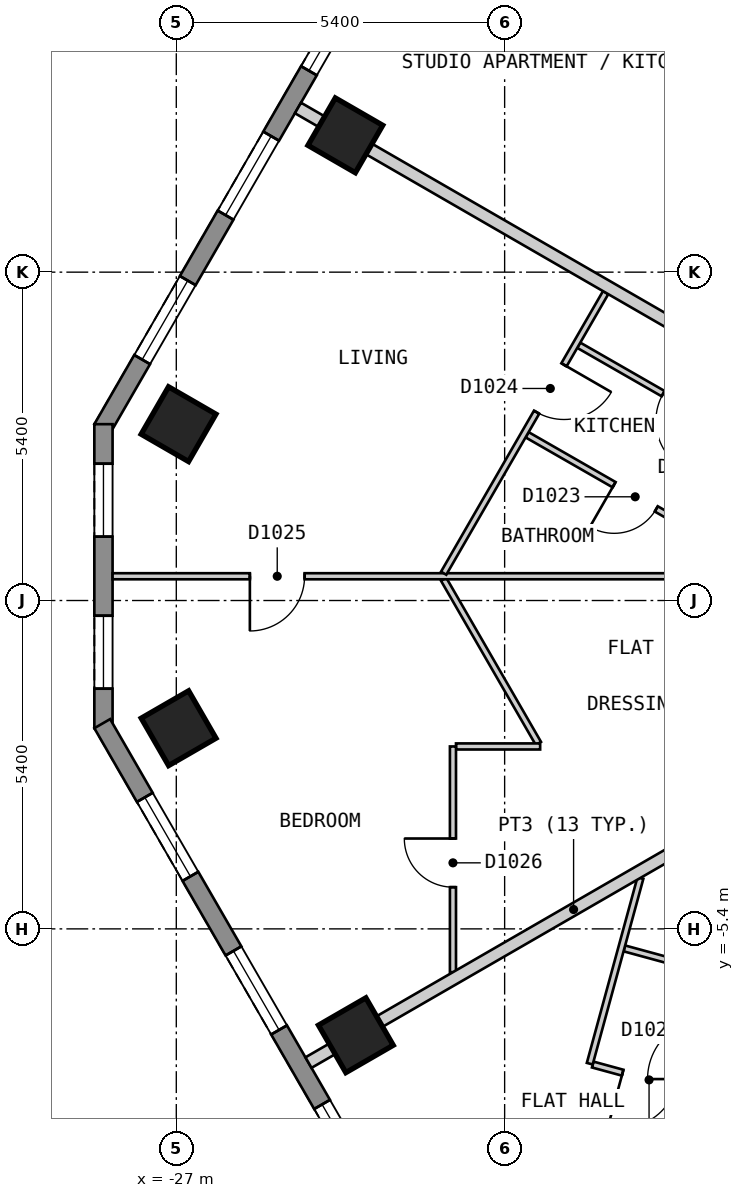
"""IFC4 building model, lengths in metres.
Left out: names, types, materials, properties, quantities, classifications, styles, units other than length and angle.
Written with IfcOpenShell. Run it as: python <this file> out.ifc"""

import sys

from ifc_helpers import new_model, si_unit, direction, frame, frame_2d, origin, origin_2d, place, context, subcontext, project, spatial, polyline, rectangle, outline, extrude, element, fill, save


model = new_model("IFC4")
c1 = context("Model", 3, precision=1e-05, world=origin(), true_north=direction((0.0, 1.0)))
c2 = subcontext(c1, "Body", "Model", "MODEL_VIEW")
j1 = project(units=[si_unit("LENGTHUNIT", "METRE"), si_unit("PLANEANGLEUNIT", "RADIAN")], contexts=[c1])
p1 = place(None, origin())
s1 = spatial("IfcSite", under=j1, at=p1, CompositionType="ELEMENT")
p2 = place(p1, origin())
s2 = spatial("IfcBuilding", under=s1, at=p2, CompositionType="ELEMENT")
p3 = place(p2, frame((0.0, 0.0, 126.6)))
s3 = spatial("IfcBuildingStorey", under=s2, at=p3, CompositionType="ELEMENT", Elevation=126.6)
for number, where, z_axis, x_axis in (
    (1, (-24.22, 7.65, 0.0), (0.0, 0.0, 1.0), (-0.5, -0.866, 0.0)),
    (2, (-26.963, 2.9, 0.0), (0.0, 0.0, 1.0), (-0.5, -0.866, 0.0)),
    (3, (-26.962, -2.1, 0.0), (0.0, 0.0, 1.0), (0.5, -0.866, 0.0)),
    (4, (-24.047, -7.149, 0.0), (0.0, 0.0, 1.0), (0.5, -0.866, 0.0)),
):
    element("IfcColumn", number, at=place(p3, frame(where, z_axis=z_axis, x_axis=x_axis)), inside=s3, PredefinedType="COLUMN", context=c2, shape_type="SweptSolid", body=[
        extrude(rectangle(XDim=0.9, YDim=0.9, at=origin_2d()), origin(), (0.0, 0.0, 1.0), 3.0),
    ])
p4 = place(p3, frame((-16.555, 23.025, 0.0), z_axis=(0.0, 0.0, 1.0), x_axis=(-0.500020536353, -0.866013546791, 0.0)))
e5 = element("IfcWall", 5, at=p4, inside=s3, PredefinedType="SOLIDWALL", context=c2, shape_type="SweptSolid", body=[
    extrude(outline(polyline([(0.0, -0.15), (23.325, -0.15), (23.245, 0.15), (0.08, 0.15), (0.0, -0.15)])), origin(), (0.0, 0.0, 1.0), 2.7),
])
p5 = place(p4, frame((1.314, 0.0, 0.15)))
e6 = element("IfcOpeningElement", 6, at=p5, cuts=e5, PredefinedType="OPENING", context=c2, shape_type="SweptSolid", body=[
    extrude(rectangle(XDim=1.5, YDim=2.1, at=frame_2d((0.75, 1.05))), frame((0.0, 0.16, 0.0), z_axis=(0.0, -1.0, 0.0), x_axis=(1.0, 0.0, 0.0)), (0.0, 0.0, 1.0), 0.32),
])
p6 = place(p4, frame((4.056, 0.0, 0.15)))
e7 = element("IfcOpeningElement", 7, at=p6, cuts=e5, PredefinedType="OPENING", context=c2, shape_type="SweptSolid", body=[
    extrude(rectangle(XDim=1.5, YDim=2.1, at=frame_2d((0.75, 1.05))), frame((0.0, 0.16, 0.0), z_axis=(0.0, -1.0, 0.0), x_axis=(1.0, 0.0, 0.0)), (0.0, 0.0, 1.0), 0.32),
])
p7 = place(p4, frame((6.799, 0.0, 0.15)))
e8 = element("IfcOpeningElement", 8, at=p7, cuts=e5, PredefinedType="OPENING", context=c2, shape_type="SweptSolid", body=[
    extrude(rectangle(XDim=1.5, YDim=2.1, at=frame_2d((0.75, 1.05))), frame((0.0, 0.16, 0.0), z_axis=(0.0, -1.0, 0.0), x_axis=(1.0, 0.0, 0.0)), (0.0, 0.0, 1.0), 0.32),
])
p8 = place(p4, frame((9.541, 0.0, 0.15)))
e9 = element("IfcOpeningElement", 9, at=p8, cuts=e5, PredefinedType="OPENING", context=c2, shape_type="SweptSolid", body=[
    extrude(rectangle(XDim=1.5, YDim=2.1, at=frame_2d((0.75, 1.05))), frame((0.0, 0.16, 0.0), z_axis=(0.0, -1.0, 0.0), x_axis=(1.0, 0.0, 0.0)), (0.0, 0.0, 1.0), 0.32),
])
p9 = place(p4, frame((12.285, 0.0, 0.15)))
e10 = element("IfcOpeningElement", 10, at=p9, cuts=e5, PredefinedType="OPENING", context=c2, shape_type="SweptSolid", body=[
    extrude(rectangle(XDim=1.5, YDim=2.1, at=frame_2d((0.75, 1.05))), frame((0.0, 0.16, 0.0), z_axis=(0.0, -1.0, 0.0), x_axis=(1.0, 0.0, 0.0)), (0.0, 0.0, 1.0), 0.32),
])
p10 = place(p4, frame((15.027, 0.0, 0.15)))
e11 = element("IfcOpeningElement", 11, at=p10, cuts=e5, PredefinedType="OPENING", context=c2, shape_type="SweptSolid", body=[
    extrude(rectangle(XDim=1.5, YDim=2.1, at=frame_2d((0.75, 1.05))), frame((0.0, 0.16, 0.0), z_axis=(0.0, -1.0, 0.0), x_axis=(1.0, 0.0, 0.0)), (0.0, 0.0, 1.0), 0.32),
])
p11 = place(p4, frame((17.769, 0.0, 0.15)))
e12 = element("IfcOpeningElement", 12, at=p11, cuts=e5, PredefinedType="OPENING", context=c2, shape_type="SweptSolid", body=[
    extrude(rectangle(XDim=1.5, YDim=2.1, at=frame_2d((0.75, 1.05))), frame((0.0, 0.16, 0.0), z_axis=(0.0, -1.0, 0.0), x_axis=(1.0, 0.0, 0.0)), (0.0, 0.0, 1.0), 0.32),
])
p12 = place(p4, frame((20.512, 0.0, 0.15)))
e13 = element("IfcOpeningElement", 13, at=p12, cuts=e5, PredefinedType="OPENING", context=c2, shape_type="SweptSolid", body=[
    extrude(rectangle(XDim=1.5, YDim=2.1, at=frame_2d((0.75, 1.05))), frame((0.0, 0.16, 0.0), z_axis=(0.0, -1.0, 0.0), x_axis=(1.0, 0.0, 0.0)), (0.0, 0.0, 1.0), 0.32),
])
p13 = place(p3, frame((-28.198, 2.9, 0.0), z_axis=(0.0, 0.0, 1.0), x_axis=(0.0, -1.0, 0.0)))
e14 = element("IfcWall", 14, at=p13, inside=s3, PredefinedType="SOLIDWALL", context=c2, shape_type="SweptSolid", body=[
    extrude(outline(polyline([(0.0, -0.15), (5.0, -0.15), (4.92, 0.15), (0.08, 0.15), (0.0, -0.15)])), origin(), (0.0, 0.0, 1.0), 2.7),
])
p14 = place(p13, frame((0.65, 0.0, 0.15)))
e15 = element("IfcOpeningElement", 15, at=p14, cuts=e14, PredefinedType="OPENING", context=c2, shape_type="SweptSolid", body=[
    extrude(rectangle(XDim=1.2, YDim=2.1, at=frame_2d((0.6, 1.05))), frame((0.0, 0.16, 0.0), z_axis=(0.0, -1.0, 0.0), x_axis=(1.0, 0.0, 0.0)), (0.0, 0.0, 1.0), 0.32),
])
p15 = place(p13, frame((3.15, 0.0, 0.15)))
e16 = element("IfcOpeningElement", 16, at=p15, cuts=e14, PredefinedType="OPENING", context=c2, shape_type="SweptSolid", body=[
    extrude(rectangle(XDim=1.2, YDim=2.1, at=frame_2d((0.6, 1.05))), frame((0.0, 0.16, 0.0), z_axis=(0.0, -1.0, 0.0), x_axis=(1.0, 0.0, 0.0)), (0.0, 0.0, 1.0), 0.32),
])
p16 = place(p3, frame((-28.218, -2.025, 0.0), z_axis=(0.0, 0.0, 1.0), x_axis=(0.500017503135, -0.866015298109, 0.0)))
e17 = element("IfcWall", 17, at=p16, inside=s3, PredefinedType="SOLIDWALL", context=c2, shape_type="SweptSolid", body=[
    extrude(outline(polyline([(0.0, -0.15), (24.711, -0.15), (24.631, 0.15), (0.08, 0.15), (0.0, -0.15)])), origin(), (0.0, 0.0, 1.0), 2.7),
])
p17 = place(p16, frame((1.4, 0.0, 0.15)))
e18 = element("IfcOpeningElement", 18, at=p17, cuts=e17, PredefinedType="OPENING", context=c2, shape_type="SweptSolid", body=[
    extrude(rectangle(XDim=1.5, YDim=2.1, at=frame_2d((0.75, 1.05))), frame((0.0, 0.16, 0.0), z_axis=(0.0, -1.0, 0.0), x_axis=(1.0, 0.0, 0.0)), (0.0, 0.0, 1.0), 0.32),
])
p18 = place(p16, frame((4.316, 0.0, 0.15)))
e19 = element("IfcOpeningElement", 19, at=p18, cuts=e17, PredefinedType="OPENING", context=c2, shape_type="SweptSolid", body=[
    extrude(rectangle(XDim=1.5, YDim=2.1, at=frame_2d((0.75, 1.05))), frame((0.0, 0.16, 0.0), z_axis=(0.0, -1.0, 0.0), x_axis=(1.0, 0.0, 0.0)), (0.0, 0.0, 1.0), 0.32),
])
p19 = place(p16, frame((7.231, 0.0, 0.15)))
e20 = element("IfcOpeningElement", 20, at=p19, cuts=e17, PredefinedType="OPENING", context=c2, shape_type="SweptSolid", body=[
    extrude(rectangle(XDim=1.5, YDim=2.1, at=frame_2d((0.75, 1.05))), frame((0.0, 0.16, 0.0), z_axis=(0.0, -1.0, 0.0), x_axis=(1.0, 0.0, 0.0)), (0.0, 0.0, 1.0), 0.32),
])
p20 = place(p16, frame((10.147, 0.0, 0.15)))
e21 = element("IfcOpeningElement", 21, at=p20, cuts=e17, PredefinedType="OPENING", context=c2, shape_type="SweptSolid", body=[
    extrude(rectangle(XDim=1.5, YDim=2.1, at=frame_2d((0.75, 1.05))), frame((0.0, 0.16, 0.0), z_axis=(0.0, -1.0, 0.0), x_axis=(1.0, 0.0, 0.0)), (0.0, 0.0, 1.0), 0.32),
])
p21 = place(p16, frame((13.062, 0.0, 0.15)))
e22 = element("IfcOpeningElement", 22, at=p21, cuts=e17, PredefinedType="OPENING", context=c2, shape_type="SweptSolid", body=[
    extrude(rectangle(XDim=1.5, YDim=2.1, at=frame_2d((0.75, 1.05))), frame((0.0, 0.16, 0.0), z_axis=(0.0, -1.0, 0.0), x_axis=(1.0, 0.0, 0.0)), (0.0, 0.0, 1.0), 0.32),
])
p22 = place(p16, frame((15.977, 0.0, 0.15)))
e23 = element("IfcOpeningElement", 23, at=p22, cuts=e17, PredefinedType="OPENING", context=c2, shape_type="SweptSolid", body=[
    extrude(rectangle(XDim=1.5, YDim=2.1, at=frame_2d((0.75, 1.05))), frame((0.0, 0.16, 0.0), z_axis=(0.0, -1.0, 0.0), x_axis=(1.0, 0.0, 0.0)), (0.0, 0.0, 1.0), 0.32),
])
p23 = place(p16, frame((18.893, 0.0, 0.15)))
e24 = element("IfcOpeningElement", 24, at=p23, cuts=e17, PredefinedType="OPENING", context=c2, shape_type="SweptSolid", body=[
    extrude(rectangle(XDim=1.5, YDim=2.1, at=frame_2d((0.75, 1.05))), frame((0.0, 0.16, 0.0), z_axis=(0.0, -1.0, 0.0), x_axis=(1.0, 0.0, 0.0)), (0.0, 0.0, 1.0), 0.32),
])
p24 = place(p16, frame((21.809, 0.0, 0.15)))
e25 = element("IfcOpeningElement", 25, at=p24, cuts=e17, PredefinedType="OPENING", context=c2, shape_type="SweptSolid", body=[
    extrude(rectangle(XDim=1.5, YDim=2.1, at=frame_2d((0.75, 1.05))), frame((0.0, 0.16, 0.0), z_axis=(0.0, -1.0, 0.0), x_axis=(1.0, 0.0, 0.0)), (0.0, 0.0, 1.0), 0.32),
])
p25 = place(p3, frame((-22.603, 0.349, 0.0), z_axis=(0.0, 0.0, 1.0), x_axis=(0.499930403552, -0.866065581584, 0.0)))
e26 = element("IfcWall", 26, at=p25, inside=s3, PredefinedType="PARTITIONING", context=c2, shape_type="SweptSolid", body=[
    extrude(rectangle(XDim=3.117, YDim=0.1, at=frame_2d((1.558, 0.0))), origin(), (0.0, 0.0, 1.0), 2.7),
])
p26 = place(p3, frame((-19.631, -5.721, 0.0), z_axis=(0.0, 0.0, 1.0), x_axis=(0.964816035809, -0.262925877475, 0.0)))
e27 = element("IfcWall", 27, at=p26, inside=s3, PredefinedType="PARTITIONING", context=c2, shape_type="SweptSolid", body=[
    extrude(rectangle(XDim=3.344, YDim=0.1, at=frame_2d((1.672, 0.0))), origin(), (0.0, 0.0, 1.0), 2.7),
])
p27 = place(p26, frame((1.047, 0.0, 0.0)))
e28 = element("IfcOpeningElement", 28, at=p27, cuts=e27, PredefinedType="OPENING", context=c2, shape_type="SweptSolid", body=[
    extrude(rectangle(XDim=0.8, YDim=2.1, at=frame_2d((0.4, 1.05))), frame((0.0, 0.06, 0.0), z_axis=(0.0, -1.0, 0.0), x_axis=(1.0, 0.0, 0.0)), (0.0, 0.0, 1.0), 0.12),
])
p28 = place(p3, frame((-20.151, -7.631, 0.0), z_axis=(0.0, 0.0, 1.0), x_axis=(0.964784947449, -0.263039930765, 0.0)))
e29 = element("IfcWall", 29, at=p28, inside=s3, PredefinedType="PARTITIONING", context=c2, shape_type="SweptSolid", body=[
    extrude(rectangle(XDim=1.866, YDim=0.1, at=frame_2d((0.933, 0.0))), origin(), (0.0, 0.0, 1.0), 2.7),
])
p29 = place(p28, frame((0.51, 0.0, 0.0)))
e30 = element("IfcOpeningElement", 30, at=p29, cuts=e29, PredefinedType="OPENING", context=c2, shape_type="SweptSolid", body=[
    extrude(rectangle(XDim=0.9, YDim=2.1, at=frame_2d((0.45, 1.05))), frame((0.0, 0.06, 0.0), z_axis=(0.0, -1.0, 0.0), x_axis=(1.0, 0.0, 0.0)), (0.0, 0.0, 1.0), 0.12),
])
p30 = place(p3, frame((-20.381, 4.198, 0.0), z_axis=(0.0, 0.0, 1.0), x_axis=(0.867459321792, -0.497508115549, 0.0)))
e31 = element("IfcWall", 31, at=p30, inside=s3, PredefinedType="PARTITIONING", context=c2, shape_type="SweptSolid", body=[
    extrude(rectangle(XDim=4.05, YDim=0.1, at=frame_2d((2.025, 0.0))), origin(), (0.0, 0.0, 1.0), 2.7),
])
p31 = place(p30, frame((1.6, 0.0, 0.0)))
e32 = element("IfcOpeningElement", 32, at=p31, cuts=e31, PredefinedType="OPENING", context=c2, shape_type="SweptSolid", body=[
    extrude(rectangle(XDim=0.9, YDim=2.1, at=frame_2d((0.45, 1.05))), frame((0.0, 0.06, 0.0), z_axis=(0.0, -1.0, 0.0), x_axis=(1.0, 0.0, 0.0)), (0.0, 0.0, 1.0), 0.12),
])
p32 = place(p3, frame((-21.231, 2.726, 0.0), z_axis=(0.0, 0.0, 1.0), x_axis=(0.867314299312, -0.497760892607, 0.0)))
e33 = element("IfcWall", 33, at=p32, inside=s3, PredefinedType="PARTITIONING", context=c2, shape_type="SweptSolid", body=[
    extrude(rectangle(XDim=4.05, YDim=0.1, at=frame_2d((2.025, 0.0))), origin(), (0.0, 0.0, 1.0), 2.7),
])
p33 = place(p32, frame((1.65, 0.0, 0.0)))
e34 = element("IfcOpeningElement", 34, at=p33, cuts=e33, PredefinedType="OPENING", context=c2, shape_type="SweptSolid", body=[
    extrude(rectangle(XDim=0.8, YDim=2.1, at=frame_2d((0.4, 1.05))), frame((0.0, 0.06, 0.0), z_axis=(0.0, -1.0, 0.0), x_axis=(1.0, 0.0, 0.0)), (0.0, 0.0, 1.0), 0.12),
])
p34 = place(p3, frame((-22.4, -2.4, 0.0), z_axis=(0.0, 0.0, 1.0), x_axis=(1.0, 0.0, 0.0)))
e35 = element("IfcWall", 35, at=p34, inside=s3, PredefinedType="PARTITIONING", context=c2, shape_type="SweptSolid", body=[
    extrude(rectangle(XDim=1.384, YDim=0.1, at=frame_2d((0.692, 0.0))), origin(), (0.0, 0.0, 1.0), 2.7),
])
p35 = place(p3, frame((-28.048, 0.399, 0.0), z_axis=(0.0, 0.0, 1.0), x_axis=(1.0, 0.0, 0.0)))
e36 = element("IfcWall", 36, at=p35, inside=s3, PredefinedType="PARTITIONING", context=c2, shape_type="SweptSolid", body=[
    extrude(rectangle(XDim=10.266, YDim=0.1, at=frame_2d((5.133, 0.0))), origin(), (0.0, 0.0, 1.0), 2.7),
])
p36 = place(p35, frame((2.258, 0.0, 0.0)))
e37 = element("IfcOpeningElement", 37, at=p36, cuts=e36, PredefinedType="OPENING", context=c2, shape_type="SweptSolid", body=[
    extrude(rectangle(XDim=0.9, YDim=2.1, at=frame_2d((0.45, 1.05))), frame((0.0, 0.06, 0.0), z_axis=(0.0, -1.0, 0.0), x_axis=(1.0, 0.0, 0.0)), (0.0, 0.0, 1.0), 0.12),
])
p37 = place(p3, frame((-22.603, 0.449, 0.0), z_axis=(0.0, 0.0, 1.0), x_axis=(0.500022588228, 0.866012362072, 0.0)))
e38 = element("IfcWall", 38, at=p37, inside=s3, PredefinedType="PARTITIONING", context=c2, shape_type="SweptSolid", body=[
    extrude(rectangle(XDim=5.328, YDim=0.1, at=frame_2d((2.664, 0.0))), origin(), (0.0, 0.0, 1.0), 2.7),
])
p38 = place(p37, frame((3.058, 0.0, 0.0)))
e39 = element("IfcOpeningElement", 39, at=p38, cuts=e38, PredefinedType="OPENING", context=c2, shape_type="SweptSolid", body=[
    extrude(rectangle(XDim=0.9, YDim=2.1, at=frame_2d((0.45, 1.05))), frame((0.0, 0.06, 0.0), z_axis=(0.0, -1.0, 0.0), x_axis=(1.0, 0.0, 0.0)), (0.0, 0.0, 1.0), 0.12),
])
p39 = place(p3, frame((-20.2, -7.617, 0.0), z_axis=(0.0, 0.0, 1.0), x_axis=(0.263150035392, 0.964754921663, 0.0)))
e40 = element("IfcWall", 40, at=p39, inside=s3, PredefinedType="PARTITIONING", context=c2, shape_type="SweptSolid", body=[
    extrude(rectangle(XDim=3.166, YDim=0.1, at=frame_2d((1.583, 0.0))), origin(), (0.0, 0.0, 1.0), 2.7),
])
p40 = place(p3, frame((-22.45, -6.112, 0.0), z_axis=(0.0, 0.0, 1.0), x_axis=(0.0, 1.0, 0.0)))
e41 = element("IfcWall", 41, at=p40, inside=s3, PredefinedType="PARTITIONING", context=c2, shape_type="SweptSolid", body=[
    extrude(rectangle(XDim=3.712, YDim=0.1, at=frame_2d((1.856, 0.0))), origin(), (0.0, 0.0, 1.0), 2.7),
])
p41 = place(p40, frame((1.398, 0.0, 0.0)))
e42 = element("IfcOpeningElement", 42, at=p41, cuts=e41, PredefinedType="OPENING", context=c2, shape_type="SweptSolid", body=[
    extrude(rectangle(XDim=0.8, YDim=2.1, at=frame_2d((0.4, 1.05))), frame((0.0, 0.06, 0.0), z_axis=(0.0, -1.0, 0.0), x_axis=(1.0, 0.0, 0.0)), (0.0, 0.0, 1.0), 0.12),
])
p42 = place(p3, frame((-24.999, 8.1, 0.0), z_axis=(0.0, 0.0, 1.0), x_axis=(0.866016855193, -0.500014806302, 0.0)))
e43 = element("IfcWall", 43, at=p42, inside=s3, PredefinedType="PARTITIONING", context=c2, shape_type="SweptSolid", body=[
    extrude(rectangle(XDim=10.0, YDim=0.2, at=frame_2d((5.0, 0.0))), origin(), (0.0, 0.0, 1.0), 2.7),
])
p43 = place(p3, frame((-22.257, 12.85, 0.0), z_axis=(0.0, 0.0, 1.0), x_axis=(0.866047370643, -0.499961950354, 0.0)))
e44 = element("IfcWall", 44, at=p43, inside=s3, PredefinedType="PARTITIONING", context=c2, shape_type="SweptSolid", body=[
    extrude(rectangle(XDim=10.001, YDim=0.2, at=frame_2d((5.0, 0.0))), origin(), (0.0, 0.0, 1.0), 2.7),
])
p44 = place(p3, frame((-24.826, -7.599, 0.0), z_axis=(0.0, 0.0, 1.0), x_axis=(0.86599621094, 0.500050560081, 0.0)))
e45 = element("IfcWall", 45, at=p44, inside=s3, PredefinedType="PARTITIONING", context=c2, shape_type="SweptSolid", body=[
    extrude(rectangle(XDim=10.069, YDim=0.2, at=frame_2d((5.035, 0.0))), origin(), (0.0, 0.0, 1.0), 2.7),
])
p45 = place(p10, origin())
e46 = element("IfcWindow", 46, at=p45, inside=s3, PartitioningType="SINGLE_PANEL", PredefinedType="WINDOW", context=c2, shape_type="SweptSolid", body=[
    extrude(rectangle(XDim=1.5, YDim=2.1, at=frame_2d((0.75, 1.05))), frame((0.0, 0.03, 0.0), z_axis=(0.0, -1.0, 0.0), x_axis=(1.0, 0.0, 0.0)), (0.0, 0.0, 1.0), 0.06),
])
fill(e11, e46)
p46 = place(p11, origin())
e47 = element("IfcWindow", 47, at=p46, inside=s3, PartitioningType="SINGLE_PANEL", PredefinedType="WINDOW", context=c2, shape_type="SweptSolid", body=[
    extrude(rectangle(XDim=1.5, YDim=2.1, at=frame_2d((0.75, 1.05))), frame((0.0, 0.03, 0.0), z_axis=(0.0, -1.0, 0.0), x_axis=(1.0, 0.0, 0.0)), (0.0, 0.0, 1.0), 0.06),
])
fill(e12, e47)
p47 = place(p12, origin())
e48 = element("IfcWindow", 48, at=p47, inside=s3, PartitioningType="SINGLE_PANEL", PredefinedType="WINDOW", context=c2, shape_type="SweptSolid", body=[
    extrude(rectangle(XDim=1.5, YDim=2.1, at=frame_2d((0.75, 1.05))), frame((0.0, 0.03, 0.0), z_axis=(0.0, -1.0, 0.0), x_axis=(1.0, 0.0, 0.0)), (0.0, 0.0, 1.0), 0.06),
])
fill(e13, e48)
p48 = place(p14, origin())
e49 = element("IfcWindow", 49, at=p48, inside=s3, PartitioningType="SINGLE_PANEL", PredefinedType="WINDOW", context=c2, shape_type="SweptSolid", body=[
    extrude(rectangle(XDim=1.2, YDim=2.1, at=frame_2d((0.6, 1.05))), frame((0.0, 0.03, 0.0), z_axis=(0.0, -1.0, 0.0), x_axis=(1.0, 0.0, 0.0)), (0.0, 0.0, 1.0), 0.06),
])
fill(e15, e49)
p49 = place(p15, origin())
e50 = element("IfcWindow", 50, at=p49, inside=s3, PartitioningType="SINGLE_PANEL", PredefinedType="WINDOW", context=c2, shape_type="SweptSolid", body=[
    extrude(rectangle(XDim=1.2, YDim=2.1, at=frame_2d((0.6, 1.05))), frame((0.0, 0.03, 0.0), z_axis=(0.0, -1.0, 0.0), x_axis=(1.0, 0.0, 0.0)), (0.0, 0.0, 1.0), 0.06),
])
fill(e16, e50)
p50 = place(p17, origin())
e51 = element("IfcWindow", 51, at=p50, inside=s3, PartitioningType="SINGLE_PANEL", PredefinedType="WINDOW", context=c2, shape_type="SweptSolid", body=[
    extrude(rectangle(XDim=1.5, YDim=2.1, at=frame_2d((0.75, 1.05))), frame((0.0, 0.03, 0.0), z_axis=(0.0, -1.0, 0.0), x_axis=(1.0, 0.0, 0.0)), (0.0, 0.0, 1.0), 0.06),
])
fill(e18, e51)
p51 = place(p18, origin())
e52 = element("IfcWindow", 52, at=p51, inside=s3, PartitioningType="SINGLE_PANEL", PredefinedType="WINDOW", context=c2, shape_type="SweptSolid", body=[
    extrude(rectangle(XDim=1.5, YDim=2.1, at=frame_2d((0.75, 1.05))), frame((0.0, 0.03, 0.0), z_axis=(0.0, -1.0, 0.0), x_axis=(1.0, 0.0, 0.0)), (0.0, 0.0, 1.0), 0.06),
])
fill(e19, e52)
p52 = place(p19, origin())
e53 = element("IfcWindow", 53, at=p52, inside=s3, PartitioningType="SINGLE_PANEL", PredefinedType="WINDOW", context=c2, shape_type="SweptSolid", body=[
    extrude(rectangle(XDim=1.5, YDim=2.1, at=frame_2d((0.75, 1.05))), frame((0.0, 0.03, 0.0), z_axis=(0.0, -1.0, 0.0), x_axis=(1.0, 0.0, 0.0)), (0.0, 0.0, 1.0), 0.06),
])
fill(e20, e53)
p53 = place(p31, origin())
e54 = element("IfcDoor", 54, at=p53, inside=s3, OperationType="SINGLE_SWING_RIGHT", PredefinedType="DOOR", context=c2, shape_type="SweptSolid", body=[
    extrude(rectangle(XDim=0.9, YDim=2.1, at=frame_2d((0.45, 1.05))), frame((0.0, 0.025, 0.0), z_axis=(0.0, -1.0, 0.0), x_axis=(1.0, 0.0, 0.0)), (0.0, 0.0, 1.0), 0.05),
])
fill(e32, e54)
p54 = place(p33, origin())
e55 = element("IfcDoor", 55, at=p54, inside=s3, OperationType="SINGLE_SWING_LEFT", PredefinedType="DOOR", context=c2, shape_type="SweptSolid", body=[
    extrude(rectangle(XDim=0.8, YDim=2.1, at=frame_2d((0.4, 1.05))), frame((0.0, 0.025, 0.0), z_axis=(0.0, -1.0, 0.0), x_axis=(1.0, 0.0, 0.0)), (0.0, 0.0, 1.0), 0.05),
])
fill(e34, e55)
p55 = place(p38, origin())
e56 = element("IfcDoor", 56, at=p55, inside=s3, OperationType="SINGLE_SWING_RIGHT", PredefinedType="DOOR", context=c2, shape_type="SweptSolid", body=[
    extrude(rectangle(XDim=0.9, YDim=2.1, at=frame_2d((0.45, 1.05))), frame((0.0, 0.025, 0.0), z_axis=(0.0, -1.0, 0.0), x_axis=(1.0, 0.0, 0.0)), (0.0, 0.0, 1.0), 0.05),
])
fill(e39, e56)
p56 = place(p36, origin())
e57 = element("IfcDoor", 57, at=p56, inside=s3, OperationType="SINGLE_SWING_LEFT", PredefinedType="DOOR", context=c2, shape_type="SweptSolid", body=[
    extrude(rectangle(XDim=0.9, YDim=2.1, at=frame_2d((0.45, 1.05))), frame((0.0, 0.025, 0.0), z_axis=(0.0, -1.0, 0.0), x_axis=(1.0, 0.0, 0.0)), (0.0, 0.0, 1.0), 0.05),
])
fill(e37, e57)
p57 = place(p41, origin())
e58 = element("IfcDoor", 58, at=p57, inside=s3, OperationType="SINGLE_SWING_RIGHT", PredefinedType="DOOR", context=c2, shape_type="SweptSolid", body=[
    extrude(rectangle(XDim=0.8, YDim=2.1, at=frame_2d((0.4, 1.05))), frame((0.0, 0.025, 0.0), z_axis=(0.0, -1.0, 0.0), x_axis=(1.0, 0.0, 0.0)), (0.0, 0.0, 1.0), 0.05),
])
fill(e42, e58)
p58 = place(p29, origin())
e59 = element("IfcDoor", 59, at=p58, inside=s3, OperationType="SINGLE_SWING_LEFT", PredefinedType="DOOR", context=c2, shape_type="SweptSolid", body=[
    extrude(rectangle(XDim=0.9, YDim=2.1, at=frame_2d((0.45, 1.05))), frame((0.0, 0.025, 0.0), z_axis=(0.0, -1.0, 0.0), x_axis=(1.0, 0.0, 0.0)), (0.0, 0.0, 1.0), 0.05),
])
fill(e30, e59)
save(model, sys.argv[1])
